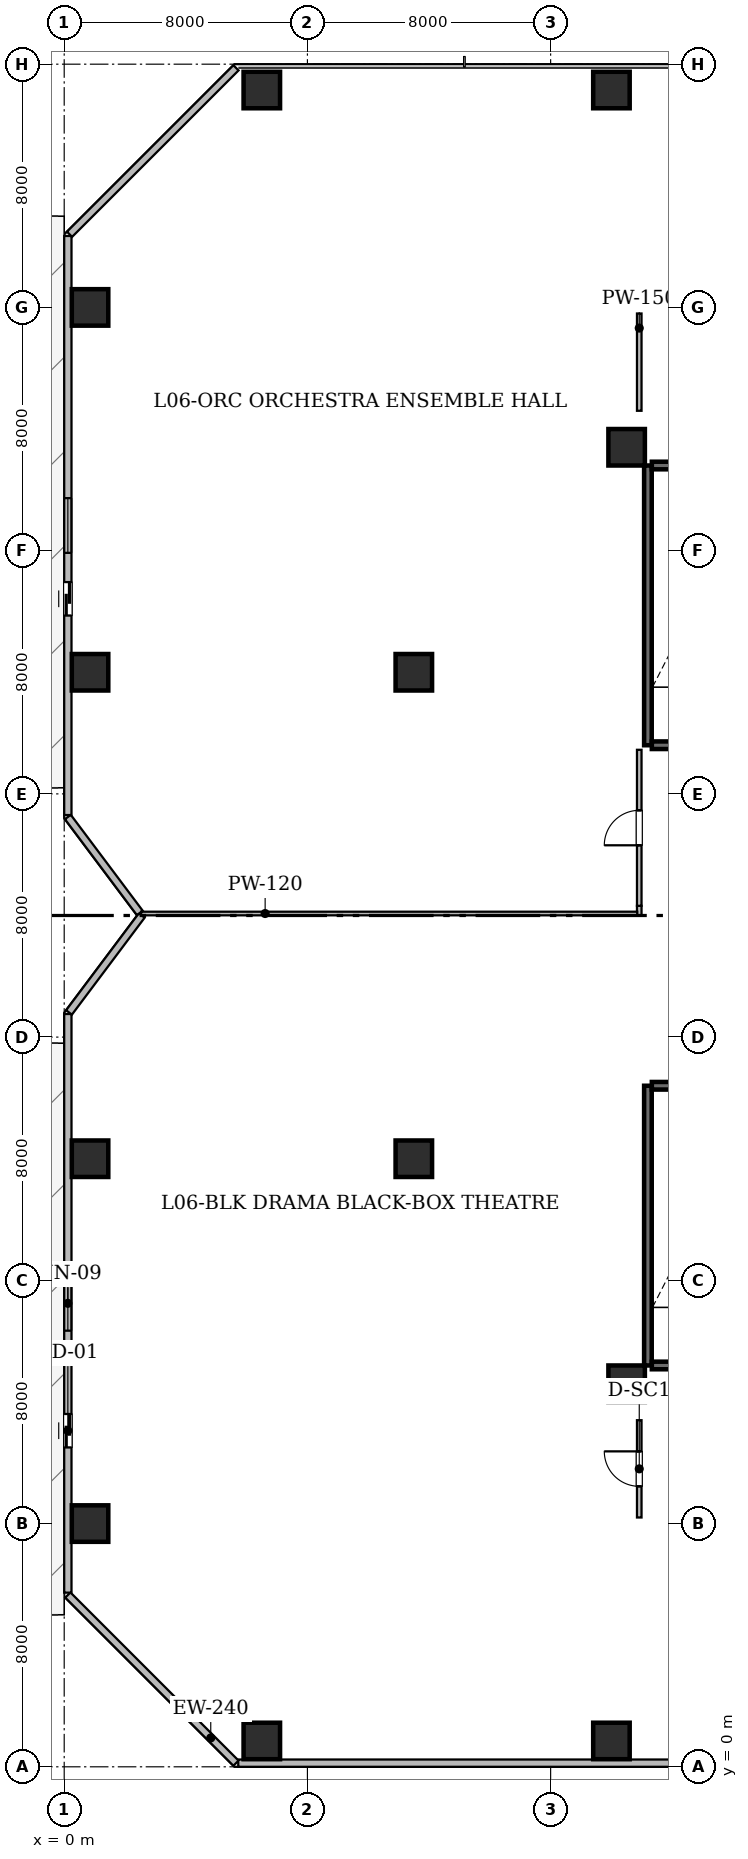
"""IFC4 building model, lengths in metres.
Left out: names, types, materials, properties, quantities, classifications, styles, units other than length and angle.
Written with IfcOpenShell. Run it as: python <this file> out.ifc"""

import sys

from ifc_helpers import new_model, si_unit, direction, frame, frame_2d, origin, origin_2d, place, context, subcontext, project, spatial, rectangle, hollow_rectangle, extrude, element, fill, save


model = new_model("IFC4")
c1 = context("Model", 3, precision=1e-05, world=origin(), true_north=direction((0.0, 1.0)))
c2 = subcontext(c1, "Body", "Model", "MODEL_VIEW")
j1 = project(units=[si_unit("LENGTHUNIT", "METRE"), si_unit("PLANEANGLEUNIT", "RADIAN")], contexts=[c1])
p1 = place(None, origin())
s1 = spatial("IfcSite", under=j1, at=p1, CompositionType="ELEMENT")
p2 = place(p1, origin())
s2 = spatial("IfcBuilding", under=s1, at=p2, CompositionType="ELEMENT")
p3 = place(p2, frame((0.0, 0.0, 28.8)))
s3 = spatial("IfcBuildingStorey", under=s2, at=p3, CompositionType="ELEMENT", Elevation=28.8)
for number, where, z_axis, x_axis in (
    (1, (6.5, 0.85, 0.0), (0.0, 0.0, 1.0), (1.0, 0.0, 0.0)),
    (2, (18.0, 0.85, 0.0), (0.0, 0.0, 1.0), (1.0, 0.0, 0.0)),
    (3, (6.5, 55.15, 0.0), (0.0, 0.0, 1.0), (1.0, 0.0, 0.0)),
    (4, (18.0, 55.15, 0.0), (0.0, 0.0, 1.0), (1.0, 0.0, 0.0)),
    (5, (0.85, 8.0, 0.0), (0.0, 0.0, 1.0), (1.0, 0.0, 0.0)),
    (6, (0.85, 20.0, 0.0), (0.0, 0.0, 1.0), (1.0, 0.0, 0.0)),
    (7, (0.85, 36.0, 0.0), (0.0, 0.0, 1.0), (1.0, 0.0, 0.0)),
    (8, (0.85, 48.0, 0.0), (0.0, 0.0, 1.0), (1.0, 0.0, 0.0)),
    (9, (18.5, 12.6, 0.0), (0.0, 0.0, 1.0), (1.0, 0.0, 0.0)),
    (10, (18.5, 43.4, 0.0), (0.0, 0.0, 1.0), (1.0, 0.0, 0.0)),
    (11, (11.5, 20.0, 0.0), (0.0, 0.0, 1.0), (1.0, 0.0, 0.0)),
    (12, (11.5, 36.0, 0.0), (0.0, 0.0, 1.0), (1.0, 0.0, 0.0)),
):
    element("IfcColumn", number, at=place(p3, frame(where, z_axis=z_axis, x_axis=x_axis)), inside=s3, PredefinedType="COLUMN", context=c2, shape_type="SweptSolid", body=[
        extrude(hollow_rectangle(XDim=1.2, YDim=1.2, WallThickness=0.06, at=origin_2d()), origin(), (0.0, 0.0, 1.0), 4.475),
    ])
p4 = place(p3, frame((5.65, 0.12, 0.0), z_axis=(0.0, 0.0, 1.0), x_axis=(-0.707106781187, 0.707106781187, 0.0)))
e13 = element("IfcWall", 13, at=p4, inside=s3, PredefinedType="STANDARD", context=c2, shape_type="SweptSolid", body=[
    extrude(rectangle(XDim=7.82, YDim=0.24, at=frame_2d((3.91, 0.0))), origin(), (0.0, 0.0, 1.0), 4.08),
])
p5 = place(p3, frame((0.12, 5.728, 0.0), z_axis=(0.0, 0.0, 1.0), x_axis=(0.0, 1.0, 0.0)))
e14 = element("IfcWall", 14, at=p5, inside=s3, PredefinedType="STANDARD", context=c2, shape_type="SweptSolid", body=[
    extrude(rectangle(XDim=19.032, YDim=0.24, at=frame_2d((9.516, 0.0))), origin(), (0.0, 0.0, 1.0), 4.08),
])
p6 = place(p5, frame((4.776, 0.0, 0.0)))
e15 = element("IfcOpeningElement", 15, at=p6, cuts=e14, PredefinedType="OPENING", context=c2, shape_type="SweptSolid", body=[
    extrude(rectangle(XDim=1.1, YDim=2.2, at=frame_2d((0.55, 1.1))), frame((0.0, 0.13, 0.0), z_axis=(0.0, -1.0, 0.0), x_axis=(1.0, 0.0, 0.0)), (0.0, 0.0, 1.0), 0.26),
])
p7 = place(p5, frame((8.616, 0.0, 0.85)))
e16 = element("IfcOpeningElement", 16, at=p7, cuts=e14, PredefinedType="OPENING", context=c2, shape_type="SweptSolid", body=[
    extrude(rectangle(XDim=1.8, YDim=0.92, at=frame_2d((0.9, 0.46))), frame((0.0, 0.13, 0.0), z_axis=(0.0, -1.0, 0.0), x_axis=(1.0, 0.0, 0.0)), (0.0, 0.0, 1.0), 0.26),
])
p8 = place(p3, frame((0.158, 24.811, 0.0), z_axis=(0.0, 0.0, 1.0), x_axis=(0.600058791648, 0.799955902889, 0.0)))
e17 = element("IfcWall", 17, at=p8, inside=s3, PredefinedType="STANDARD", context=c2, shape_type="SweptSolid", body=[
    extrude(rectangle(XDim=3.986, YDim=0.24, at=frame_2d((1.993, 0.0))), origin(), (0.0, 0.0, 1.0), 4.08),
])
p9 = place(p3, frame((2.487, 28.084, 0.0), z_axis=(0.0, 0.0, 1.0), x_axis=(-0.599990098106, 0.800007426325, 0.0)))
e18 = element("IfcWall", 18, at=p9, inside=s3, PredefinedType="STANDARD", context=c2, shape_type="SweptSolid", body=[
    extrude(rectangle(XDim=3.945, YDim=0.24, at=frame_2d((1.973, 0.0))), origin(), (0.0, 0.0, 1.0), 4.08),
])
p10 = place(p3, frame((0.12, 31.304, 0.0), z_axis=(0.0, 0.0, 1.0), x_axis=(0.0, 1.0, 0.0)))
e19 = element("IfcWall", 19, at=p10, inside=s3, PredefinedType="STANDARD", context=c2, shape_type="SweptSolid", body=[
    extrude(rectangle(XDim=19.046, YDim=0.24, at=frame_2d((9.523, 0.0))), origin(), (0.0, 0.0, 1.0), 4.08),
])
p11 = place(p10, frame((6.562, 0.0, 0.0)))
e20 = element("IfcOpeningElement", 20, at=p11, cuts=e19, PredefinedType="OPENING", context=c2, shape_type="SweptSolid", body=[
    extrude(rectangle(XDim=1.1, YDim=2.2, at=frame_2d((0.55, 1.1))), frame((0.0, 0.13, 0.0), z_axis=(0.0, -1.0, 0.0), x_axis=(1.0, 0.0, 0.0)), (0.0, 0.0, 1.0), 0.26),
])
p12 = place(p10, frame((8.623, 0.0, 0.85)))
e21 = element("IfcOpeningElement", 21, at=p12, cuts=e19, PredefinedType="OPENING", context=c2, shape_type="SweptSolid", body=[
    extrude(rectangle(XDim=1.8, YDim=0.92, at=frame_2d((0.9, 0.46))), frame((0.0, 0.13, 0.0), z_axis=(0.0, -1.0, 0.0), x_axis=(1.0, 0.0, 0.0)), (0.0, 0.0, 1.0), 0.26),
])
p13 = place(p3, frame((0.175, 50.405, 0.0), z_axis=(0.0, 0.0, 1.0), x_axis=(0.707106781187, 0.707106781187, 0.0)))
e22 = element("IfcWall", 22, at=p13, inside=s3, PredefinedType="STANDARD", context=c2, shape_type="SweptSolid", body=[
    extrude(rectangle(XDim=7.743, YDim=0.24, at=frame_2d((3.871, 0.0))), origin(), (0.0, 0.0, 1.0), 4.08),
])
p14 = place(p3, frame((50.275, 0.12, 0.0), z_axis=(0.0, 0.0, 1.0), x_axis=(-1.0, 0.0, 0.0)))
e23 = element("IfcWall", 23, at=p14, inside=s3, PredefinedType="STANDARD", context=c2, shape_type="SweptSolid", body=[
    extrude(rectangle(XDim=44.55, YDim=0.24, at=frame_2d((22.275, 0.0))), origin(), (0.0, 0.0, 1.0), 4.08),
])
p15 = place(p14, frame((15.275, 0.0, 0.85)))
e24 = element("IfcOpeningElement", 24, at=p15, cuts=e23, PredefinedType="OPENING", context=c2, shape_type="SweptSolid", body=[
    extrude(rectangle(XDim=1.8, YDim=0.92, at=frame_2d((0.9, 0.46))), frame((0.0, 0.13, 0.0), z_axis=(0.0, -1.0, 0.0), x_axis=(1.0, 0.0, 0.0)), (0.0, 0.0, 1.0), 0.26),
])
p16 = place(p3, frame((19.2, 13.2, 0.0), z_axis=(0.0, 0.0, 1.0), x_axis=(0.0, 1.0, 0.0)))
e25 = element("IfcWall", 25, at=p16, inside=s3, PredefinedType="SHEAR", context=c2, shape_type="SweptSolid", body=[
    extrude(rectangle(XDim=9.2, YDim=0.25, at=frame_2d((4.6, 0.0))), origin(), (0.0, 0.0, 1.0), 4.08),
])
for number, where, z_axis, x_axis in (
    (26, (19.329, 13.2, 0.0), (0.0, 0.0, 1.0), (1.0, 0.0, 0.0)),
    (27, (19.329, 22.4, 0.0), (0.0, 0.0, 1.0), (1.0, 0.0, 0.0)),
):
    element("IfcWall", number, at=place(p3, frame(where, z_axis=z_axis, x_axis=x_axis)), inside=s3, PredefinedType="SHEAR", context=c2, shape_type="SweptSolid", body=[
        extrude(rectangle(XDim=3.692, YDim=0.25, at=frame_2d((1.846, 0.0))), origin(), (0.0, 0.0, 1.0), 4.08),
    ])
p17 = place(p3, frame((19.2, 33.6, 0.0), z_axis=(0.0, 0.0, 1.0), x_axis=(0.0, 1.0, 0.0)))
e28 = element("IfcWall", 28, at=p17, inside=s3, PredefinedType="SHEAR", context=c2, shape_type="SweptSolid", body=[
    extrude(rectangle(XDim=9.2, YDim=0.25, at=frame_2d((4.6, 0.0))), origin(), (0.0, 0.0, 1.0), 4.08),
])
for number, where, z_axis, x_axis in (
    (29, (19.329, 33.6, 0.0), (0.0, 0.0, 1.0), (1.0, 0.0, 0.0)),
    (30, (19.329, 42.8, 0.0), (0.0, 0.0, 1.0), (1.0, 0.0, 0.0)),
):
    element("IfcWall", number, at=place(p3, frame(where, z_axis=z_axis, x_axis=x_axis)), inside=s3, PredefinedType="SHEAR", context=c2, shape_type="SweptSolid", body=[
        extrude(rectangle(XDim=3.692, YDim=0.25, at=frame_2d((1.846, 0.0))), origin(), (0.0, 0.0, 1.0), 4.08),
    ])
p18 = place(p3, frame((18.915, 28.0, 0.0), z_axis=(0.0, 0.0, 1.0), x_axis=(0.0, 1.0, 0.0)))
e31 = element("IfcWall", 31, at=p18, inside=s3, PredefinedType="STANDARD", context=c2, shape_type="SweptSolid", body=[
    extrude(rectangle(XDim=0.318, YDim=0.15, at=frame_2d((0.159, 0.0))), origin(), (0.0, 0.0, 1.0), 2.67),
])
p19 = place(p3, frame((18.915, 8.2, 0.0), z_axis=(0.0, 0.0, 1.0), x_axis=(0.0, 1.0, 0.0)))
e32 = element("IfcWall", 32, at=p19, inside=s3, PredefinedType="STANDARD", context=c2, shape_type="SweptSolid", body=[
    extrude(rectangle(XDim=3.2, YDim=0.15, at=frame_2d((1.6, 0.0))), origin(), (0.0, 0.0, 1.0), 2.67),
])
p20 = place(p19, frame((1.025, 0.0, 0.0)))
e33 = element("IfcOpeningElement", 33, at=p20, cuts=e32, PredefinedType="OPENING", context=c2, shape_type="SweptSolid", body=[
    extrude(rectangle(XDim=1.15, YDim=2.2, at=frame_2d((0.575, 1.1))), frame((0.0, 0.085, 0.0), z_axis=(0.0, -1.0, 0.0), x_axis=(1.0, 0.0, 0.0)), (0.0, 0.0, 1.0), 0.17),
])
p21 = place(p3, frame((18.915, 28.318, 0.0), z_axis=(0.0, 0.0, 1.0), x_axis=(0.0, 1.0, 0.0)))
e34 = element("IfcWall", 34, at=p21, inside=s3, PredefinedType="STANDARD", context=c2, shape_type="SweptSolid", body=[
    extrude(rectangle(XDim=5.132, YDim=0.15, at=frame_2d((2.566, 0.0))), origin(), (0.0, 0.0, 1.0), 2.67),
])
p22 = place(p21, frame((1.991, 0.0, 0.0)))
e35 = element("IfcOpeningElement", 35, at=p22, cuts=e34, PredefinedType="OPENING", context=c2, shape_type="SweptSolid", body=[
    extrude(rectangle(XDim=1.15, YDim=2.2, at=frame_2d((0.575, 1.1))), frame((0.0, 0.085, 0.0), z_axis=(0.0, -1.0, 0.0), x_axis=(1.0, 0.0, 0.0)), (0.0, 0.0, 1.0), 0.17),
])
p23 = place(p3, frame((18.915, 44.6, 0.0), z_axis=(0.0, 0.0, 1.0), x_axis=(0.0, 1.0, 0.0)))
e36 = element("IfcWall", 36, at=p23, inside=s3, PredefinedType="STANDARD", context=c2, shape_type="SweptSolid", body=[
    extrude(rectangle(XDim=3.2, YDim=0.15, at=frame_2d((1.6, 0.0))), origin(), (0.0, 0.0, 1.0), 2.67),
])
p24 = place(p3, frame((2.53, 28.065, 0.0), z_axis=(0.0, 0.0, 1.0), x_axis=(1.0, 0.0, 0.0)))
e37 = element("IfcWall", 37, at=p24, inside=s3, PredefinedType="PARTITIONING", context=c2, shape_type="SweptSolid", body=[
    extrude(rectangle(XDim=16.318, YDim=0.12, at=frame_2d((8.159, 0.0))), origin(), (0.0, 0.0, 1.0), 2.67),
])
p25 = place(p6, origin())
e38 = element("IfcDoor", 38, at=p25, inside=s3, OperationType="SLIDING_TO_LEFT", PredefinedType="DOOR", context=c2, shape_type="SweptSolid", body=[
    extrude(rectangle(XDim=1.1, YDim=2.2, at=frame_2d((0.55, 1.1))), frame((0.0, 0.025, 0.0), z_axis=(0.0, -1.0, 0.0), x_axis=(1.0, 0.0, 0.0)), (0.0, 0.0, 1.0), 0.05),
])
fill(e15, e38)
p26 = place(p11, origin())
e39 = element("IfcDoor", 39, at=p26, inside=s3, OperationType="SLIDING_TO_LEFT", PredefinedType="DOOR", context=c2, shape_type="SweptSolid", body=[
    extrude(rectangle(XDim=1.1, YDim=2.2, at=frame_2d((0.55, 1.1))), frame((0.0, 0.025, 0.0), z_axis=(0.0, -1.0, 0.0), x_axis=(1.0, 0.0, 0.0)), (0.0, 0.0, 1.0), 0.05),
])
fill(e20, e39)
p27 = place(p7, origin())
e40 = element("IfcWindow", 40, at=p27, inside=s3, PartitioningType="SINGLE_PANEL", PredefinedType="WINDOW", context=c2, shape_type="SweptSolid", body=[
    extrude(rectangle(XDim=1.8, YDim=0.92, at=frame_2d((0.9, 0.46))), frame((0.0, 0.03, 0.0), z_axis=(0.0, -1.0, 0.0), x_axis=(1.0, 0.0, 0.0)), (0.0, 0.0, 1.0), 0.06),
])
fill(e16, e40)
p28 = place(p12, origin())
e41 = element("IfcWindow", 41, at=p28, inside=s3, PartitioningType="SINGLE_PANEL", PredefinedType="WINDOW", context=c2, shape_type="SweptSolid", body=[
    extrude(rectangle(XDim=1.8, YDim=0.92, at=frame_2d((0.9, 0.46))), frame((0.0, 0.03, 0.0), z_axis=(0.0, -1.0, 0.0), x_axis=(1.0, 0.0, 0.0)), (0.0, 0.0, 1.0), 0.06),
])
fill(e21, e41)
p29 = place(p20, origin())
e42 = element("IfcDoor", 42, at=p29, inside=s3, OperationType="SINGLE_SWING_RIGHT", PredefinedType="DOOR", context=c2, shape_type="SweptSolid", body=[
    extrude(rectangle(XDim=1.15, YDim=2.2, at=frame_2d((0.575, 1.1))), frame((0.0, 0.025, 0.0), z_axis=(0.0, -1.0, 0.0), x_axis=(1.0, 0.0, 0.0)), (0.0, 0.0, 1.0), 0.05),
])
fill(e33, e42)
p30 = place(p22, origin())
e43 = element("IfcDoor", 43, at=p30, inside=s3, OperationType="SINGLE_SWING_LEFT", PredefinedType="DOOR", context=c2, shape_type="SweptSolid", body=[
    extrude(rectangle(XDim=1.15, YDim=2.2, at=frame_2d((0.575, 1.1))), frame((0.0, 0.025, 0.0), z_axis=(0.0, -1.0, 0.0), x_axis=(1.0, 0.0, 0.0)), (0.0, 0.0, 1.0), 0.05),
])
fill(e35, e43)
save(model, sys.argv[1])
